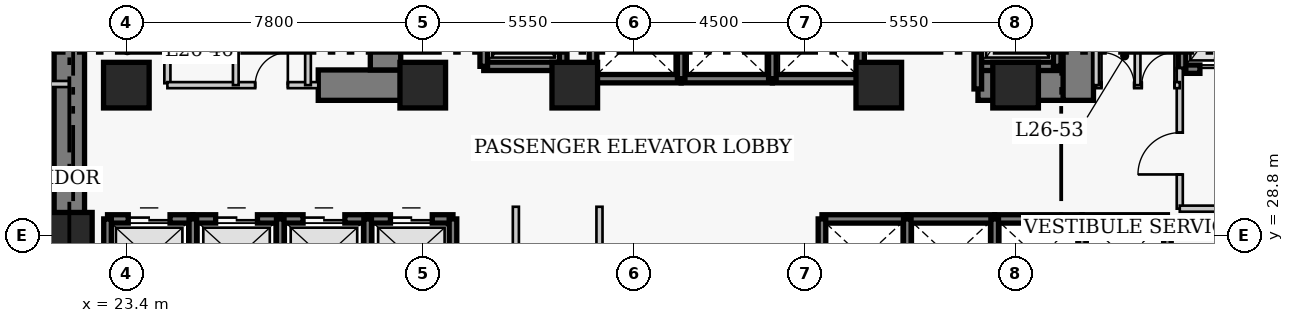
"""IFC4 building model, lengths in metres.
Left out: names, types, materials, properties, quantities, classifications, styles, units other than length and angle.
Written with IfcOpenShell. Run it as: python <this file> out.ifc"""

import sys

from ifc_helpers import new_model, si_unit, direction, frame, frame_2d, origin, origin_2d, place, context, subcontext, project, spatial, rectangle, extrude, element, fill, save


model = new_model("IFC4")
c1 = context("Model", 3, precision=1e-05, world=origin(), true_north=direction((0.0, 1.0)))
c2 = subcontext(c1, "Body", "Model", "MODEL_VIEW")
j1 = project(units=[si_unit("LENGTHUNIT", "METRE"), si_unit("PLANEANGLEUNIT", "RADIAN")], contexts=[c1])
p1 = place(None, origin())
s1 = spatial("IfcSite", under=j1, at=p1, CompositionType="ELEMENT")
p2 = place(p1, origin())
s2 = spatial("IfcBuilding", under=s1, at=p2, CompositionType="ELEMENT")
p3 = place(p2, frame((0.0, 0.0, 107.0)))
s3 = spatial("IfcBuildingStorey", under=s2, at=p3, CompositionType="ELEMENT", Elevation=107.0)
p4 = place(p3, frame((21.9, 27.05, 0.0), z_axis=(0.0, 0.0, 1.0), x_axis=(0.0, 1.0, 0.0)))
e1 = element("IfcWall", 1, at=p4, inside=s3, PredefinedType="SHEAR", context=c2, shape_type="SweptSolid", body=[
    extrude(rectangle(XDim=13.67, YDim=0.8, at=frame_2d((6.835, 0.0))), origin(), (0.0, 0.0, 1.0), 3.8),
])
p5 = place(p3, frame((28.45, 32.75, 0.0), z_axis=(0.0, 0.0, 1.0), x_axis=(1.0, 0.0, 0.0)))
e2 = element("IfcWall", 2, at=p5, inside=s3, PredefinedType="SHEAR", context=c2, shape_type="SweptSolid", body=[
    extrude(rectangle(XDim=2.4, YDim=0.8, at=frame_2d((1.2, 0.0))), origin(), (0.0, 0.0, 1.0), 3.8),
])
p6 = place(p3, frame((45.81, 32.75, 0.0), z_axis=(0.0, 0.0, 1.0), x_axis=(1.0, 0.0, 0.0)))
e3 = element("IfcWall", 3, at=p6, inside=s3, PredefinedType="SHEAR", context=c2, shape_type="SweptSolid", body=[
    extrude(rectangle(XDim=2.64, YDim=0.8, at=frame_2d((1.32, 0.0))), origin(), (0.0, 0.0, 1.0), 3.8),
])
p7 = place(p3, frame((30.22, 33.15, 0.0), z_axis=(0.0, 0.0, 1.0), x_axis=(0.0, 1.0, 0.0)))
e4 = element("IfcWall", 4, at=p7, inside=s3, PredefinedType="SHEAR", context=c2, shape_type="SweptSolid", body=[
    extrude(rectangle(XDim=7.17, YDim=0.8, at=frame_2d((3.585, 0.0))), origin(), (0.0, 0.0, 1.0), 3.8),
])
p8 = place(p3, frame((48.45, 32.35, 0.0), z_axis=(0.0, 0.0, 1.0), x_axis=(0.0, 1.0, 0.0)))
e5 = element("IfcWall", 5, at=p8, inside=s3, PredefinedType="SHEAR", context=c2, shape_type="SweptSolid", body=[
    extrude(rectangle(XDim=7.97, YDim=0.8, at=frame_2d((3.985, 0.0))), origin(), (0.0, 0.0, 1.0), 3.8),
])
p9 = place(p8, frame((5.85, 0.0, 0.0)))
e6 = element("IfcOpeningElement", 6, at=p9, cuts=e5, PredefinedType="OPENING", context=c2, shape_type="SweptSolid", body=[
    extrude(rectangle(XDim=1.1, YDim=2.15, at=frame_2d((0.55, 1.075))), frame((0.0, 0.41, 0.0), z_axis=(0.0, -1.0, 0.0), x_axis=(1.0, 0.0, 0.0)), (0.0, 0.0, 1.0), 0.82),
])
for number, where, z_axis, x_axis in (
    (7, (21.9, 28.8, 0.0), (0.0, 0.0, 1.0), (1.0, 0.0, 0.0)),
    (8, (23.4, 32.75, 0.0), (0.0, 0.0, 1.0), (1.0, 0.0, 0.0)),
    (9, (31.2, 32.75, 0.0), (0.0, 0.0, 1.0), (1.0, 0.0, 0.0)),
    (10, (35.2, 32.75, 0.0), (0.0, 0.0, 1.0), (1.0, 0.0, 0.0)),
    (11, (43.2, 32.75, 0.0), (0.0, 0.0, 1.0), (1.0, 0.0, 0.0)),
    (12, (46.8, 32.75, 0.0), (0.0, 0.0, 1.0), (1.0, 0.0, 0.0)),
):
    element("IfcColumn", number, at=place(p3, frame(where, z_axis=z_axis, x_axis=x_axis)), inside=s3, PredefinedType="COLUMN", context=c2, shape_type="SweptSolid", body=[
        extrude(rectangle(XDim=1.2, YDim=1.2, at=origin_2d()), origin(), (0.0, 0.0, 1.0), 3.8),
    ])
p10 = place(p3, frame((22.905, 29.23, 0.0), z_axis=(0.0, 0.0, 1.0), x_axis=(1.0, 0.0, 0.0)))
e13 = element("IfcWall", 13, at=p10, inside=s3, PredefinedType="SHEAR", context=c2, shape_type="SweptSolid", body=[
    extrude(rectangle(XDim=2.245, YDim=0.22, at=frame_2d((1.123, 0.0))), origin(), (0.0, 0.0, 1.0), 3.8),
])
p11 = place(p10, frame((0.545, 0.0, 0.0)))
e14 = element("IfcOpeningElement", 14, at=p11, cuts=e13, PredefinedType="OPENING", context=c2, shape_type="SweptSolid", body=[
    extrude(rectangle(XDim=1.1, YDim=2.15, at=frame_2d((0.55, 1.075))), frame((0.0, 0.12, 0.0), z_axis=(0.0, -1.0, 0.0), x_axis=(1.0, 0.0, 0.0)), (0.0, 0.0, 1.0), 0.24),
])
p12 = place(p3, frame((22.905, 27.17, 0.0), z_axis=(0.0, 0.0, 1.0), x_axis=(0.0, 1.0, 0.0)))
e15 = element("IfcWall", 15, at=p12, inside=s3, PredefinedType="SHEAR", context=c2, shape_type="SweptSolid", body=[
    extrude(rectangle(XDim=2.06, YDim=0.2, at=frame_2d((1.03, 0.0))), origin(), (0.0, 0.0, 1.0), 3.8),
])
p13 = place(p3, frame((25.15, 29.23, 0.0), z_axis=(0.0, 0.0, 1.0), x_axis=(1.0, 0.0, 0.0)))
e16 = element("IfcWall", 16, at=p13, inside=s3, PredefinedType="SHEAR", context=c2, shape_type="SweptSolid", body=[
    extrude(rectangle(XDim=2.3, YDim=0.22, at=frame_2d((1.15, 0.0))), origin(), (0.0, 0.0, 1.0), 3.8),
])
p14 = place(p13, frame((0.6, 0.0, 0.0)))
e17 = element("IfcOpeningElement", 17, at=p14, cuts=e16, PredefinedType="OPENING", context=c2, shape_type="SweptSolid", body=[
    extrude(rectangle(XDim=1.1, YDim=2.15, at=frame_2d((0.55, 1.075))), frame((0.0, 0.12, 0.0), z_axis=(0.0, -1.0, 0.0), x_axis=(1.0, 0.0, 0.0)), (0.0, 0.0, 1.0), 0.24),
])
p15 = place(p3, frame((25.15, 27.17, 0.0), z_axis=(0.0, 0.0, 1.0), x_axis=(0.0, 1.0, 0.0)))
e18 = element("IfcWall", 18, at=p15, inside=s3, PredefinedType="SHEAR", context=c2, shape_type="SweptSolid", body=[
    extrude(rectangle(XDim=2.06, YDim=0.2, at=frame_2d((1.03, 0.0))), origin(), (0.0, 0.0, 1.0), 3.8),
])
p16 = place(p3, frame((27.45, 29.23, 0.0), z_axis=(0.0, 0.0, 1.0), x_axis=(1.0, 0.0, 0.0)))
e19 = element("IfcWall", 19, at=p16, inside=s3, PredefinedType="SHEAR", context=c2, shape_type="SweptSolid", body=[
    extrude(rectangle(XDim=2.3, YDim=0.22, at=frame_2d((1.15, 0.0))), origin(), (0.0, 0.0, 1.0), 3.8),
])
p17 = place(p16, frame((0.6, 0.0, 0.0)))
e20 = element("IfcOpeningElement", 20, at=p17, cuts=e19, PredefinedType="OPENING", context=c2, shape_type="SweptSolid", body=[
    extrude(rectangle(XDim=1.1, YDim=2.15, at=frame_2d((0.55, 1.075))), frame((0.0, 0.12, 0.0), z_axis=(0.0, -1.0, 0.0), x_axis=(1.0, 0.0, 0.0)), (0.0, 0.0, 1.0), 0.24),
])
p18 = place(p3, frame((27.45, 27.17, 0.0), z_axis=(0.0, 0.0, 1.0), x_axis=(0.0, 1.0, 0.0)))
e21 = element("IfcWall", 21, at=p18, inside=s3, PredefinedType="SHEAR", context=c2, shape_type="SweptSolid", body=[
    extrude(rectangle(XDim=2.06, YDim=0.2, at=frame_2d((1.03, 0.0))), origin(), (0.0, 0.0, 1.0), 3.8),
])
p19 = place(p3, frame((29.75, 29.23, 0.0), z_axis=(0.0, 0.0, 1.0), x_axis=(1.0, 0.0, 0.0)))
e22 = element("IfcWall", 22, at=p19, inside=s3, PredefinedType="SHEAR", context=c2, shape_type="SweptSolid", body=[
    extrude(rectangle(XDim=2.245, YDim=0.22, at=frame_2d((1.123, 0.0))), origin(), (0.0, 0.0, 1.0), 3.8),
])
p20 = place(p19, frame((0.6, 0.0, 0.0)))
e23 = element("IfcOpeningElement", 23, at=p20, cuts=e22, PredefinedType="OPENING", context=c2, shape_type="SweptSolid", body=[
    extrude(rectangle(XDim=1.1, YDim=2.15, at=frame_2d((0.55, 1.075))), frame((0.0, 0.12, 0.0), z_axis=(0.0, -1.0, 0.0), x_axis=(1.0, 0.0, 0.0)), (0.0, 0.0, 1.0), 0.24),
])
for number, where, z_axis, x_axis in (
    (24, (29.75, 27.17, 0.0), (0.0, 0.0, 1.0), (0.0, 1.0, 0.0)),
    (25, (31.995, 27.17, 0.0), (0.0, 0.0, 1.0), (0.0, 1.0, 0.0)),
):
    element("IfcWall", number, at=place(p3, frame(where, z_axis=z_axis, x_axis=x_axis)), inside=s3, PredefinedType="SHEAR", context=c2, shape_type="SweptSolid", body=[
        extrude(rectangle(XDim=2.06, YDim=0.2, at=frame_2d((1.03, 0.0))), origin(), (0.0, 0.0, 1.0), 3.8),
    ])
p21 = place(p3, frame((41.705, 29.23, 0.0), z_axis=(0.0, 0.0, 1.0), x_axis=(1.0, 0.0, 0.0)))
e26 = element("IfcWall", 26, at=p21, inside=s3, PredefinedType="SHEAR", context=c2, shape_type="SweptSolid", body=[
    extrude(rectangle(XDim=2.245, YDim=0.22, at=frame_2d((1.123, 0.0))), origin(), (0.0, 0.0, 1.0), 3.8),
])
p22 = place(p3, frame((41.705, 27.17, 0.0), z_axis=(0.0, 0.0, 1.0), x_axis=(0.0, 1.0, 0.0)))
e27 = element("IfcWall", 27, at=p22, inside=s3, PredefinedType="SHEAR", context=c2, shape_type="SweptSolid", body=[
    extrude(rectangle(XDim=2.06, YDim=0.2, at=frame_2d((1.03, 0.0))), origin(), (0.0, 0.0, 1.0), 3.8),
])
p23 = place(p3, frame((43.95, 29.23, 0.0), z_axis=(0.0, 0.0, 1.0), x_axis=(1.0, 0.0, 0.0)))
e28 = element("IfcWall", 28, at=p23, inside=s3, PredefinedType="SHEAR", context=c2, shape_type="SweptSolid", body=[
    extrude(rectangle(XDim=2.3, YDim=0.22, at=frame_2d((1.15, 0.0))), origin(), (0.0, 0.0, 1.0), 3.8),
])
p24 = place(p3, frame((43.95, 27.17, 0.0), z_axis=(0.0, 0.0, 1.0), x_axis=(0.0, 1.0, 0.0)))
e29 = element("IfcWall", 29, at=p24, inside=s3, PredefinedType="SHEAR", context=c2, shape_type="SweptSolid", body=[
    extrude(rectangle(XDim=2.06, YDim=0.2, at=frame_2d((1.03, 0.0))), origin(), (0.0, 0.0, 1.0), 3.8),
])
p25 = place(p3, frame((46.25, 29.23, 0.0), z_axis=(0.0, 0.0, 1.0), x_axis=(1.0, 0.0, 0.0)))
e30 = element("IfcWall", 30, at=p25, inside=s3, PredefinedType="SHEAR", context=c2, shape_type="SweptSolid", body=[
    extrude(rectangle(XDim=2.3, YDim=0.22, at=frame_2d((1.15, 0.0))), origin(), (0.0, 0.0, 1.0), 3.8),
])
p26 = place(p3, frame((46.25, 27.17, 0.0), z_axis=(0.0, 0.0, 1.0), x_axis=(0.0, 1.0, 0.0)))
e31 = element("IfcWall", 31, at=p26, inside=s3, PredefinedType="SHEAR", context=c2, shape_type="SweptSolid", body=[
    extrude(rectangle(XDim=2.06, YDim=0.2, at=frame_2d((1.03, 0.0))), origin(), (0.0, 0.0, 1.0), 3.8),
])
p27 = place(p3, frame((48.55, 29.23, 0.0), z_axis=(0.0, 0.0, 1.0), x_axis=(1.0, 0.0, 0.0)))
e32 = element("IfcWall", 32, at=p27, inside=s3, PredefinedType="SHEAR", context=c2, shape_type="SweptSolid", body=[
    extrude(rectangle(XDim=2.245, YDim=0.22, at=frame_2d((1.123, 0.0))), origin(), (0.0, 0.0, 1.0), 3.8),
])
for number, where, z_axis, x_axis in (
    (33, (48.55, 27.17, 0.0), (0.0, 0.0, 1.0), (0.0, 1.0, 0.0)),
    (34, (50.795, 27.17, 0.0), (0.0, 0.0, 1.0), (0.0, 1.0, 0.0)),
):
    element("IfcWall", number, at=place(p3, frame(where, z_axis=z_axis, x_axis=x_axis)), inside=s3, PredefinedType="SHEAR", context=c2, shape_type="SweptSolid", body=[
        extrude(rectangle(XDim=2.06, YDim=0.2, at=frame_2d((1.03, 0.0))), origin(), (0.0, 0.0, 1.0), 3.8),
    ])
p28 = place(p3, frame((35.68, 32.92, 0.0), z_axis=(0.0, 0.0, 1.0), x_axis=(1.0, 0.0, 0.0)))
e35 = element("IfcWall", 35, at=p28, inside=s3, PredefinedType="SHEAR", context=c2, shape_type="SweptSolid", body=[
    extrude(rectangle(XDim=2.32, YDim=0.22, at=frame_2d((1.16, 0.0))), origin(), (0.0, 0.0, 1.0), 3.8),
])
p29 = place(p3, frame((35.68, 32.92, 0.0), z_axis=(0.0, 0.0, 1.0), x_axis=(0.0, 1.0, 0.0)))
e36 = element("IfcWall", 36, at=p29, inside=s3, PredefinedType="SHEAR", context=c2, shape_type="SweptSolid", body=[
    extrude(rectangle(XDim=2.16, YDim=0.2, at=frame_2d((1.08, 0.0))), origin(), (0.0, 0.0, 1.0), 3.8),
])
p30 = place(p3, frame((38.0, 32.92, 0.0), z_axis=(0.0, 0.0, 1.0), x_axis=(1.0, 0.0, 0.0)))
e37 = element("IfcWall", 37, at=p30, inside=s3, PredefinedType="SHEAR", context=c2, shape_type="SweptSolid", body=[
    extrude(rectangle(XDim=2.4, YDim=0.22, at=frame_2d((1.2, 0.0))), origin(), (0.0, 0.0, 1.0), 3.8),
])
p31 = place(p3, frame((38.0, 32.92, 0.0), z_axis=(0.0, 0.0, 1.0), x_axis=(0.0, 1.0, 0.0)))
e38 = element("IfcWall", 38, at=p31, inside=s3, PredefinedType="SHEAR", context=c2, shape_type="SweptSolid", body=[
    extrude(rectangle(XDim=2.16, YDim=0.2, at=frame_2d((1.08, 0.0))), origin(), (0.0, 0.0, 1.0), 3.8),
])
p32 = place(p3, frame((40.4, 32.92, 0.0), z_axis=(0.0, 0.0, 1.0), x_axis=(1.0, 0.0, 0.0)))
e39 = element("IfcWall", 39, at=p32, inside=s3, PredefinedType="SHEAR", context=c2, shape_type="SweptSolid", body=[
    extrude(rectangle(XDim=2.32, YDim=0.22, at=frame_2d((1.16, 0.0))), origin(), (0.0, 0.0, 1.0), 3.8),
])
for number, where, z_axis, x_axis in (
    (40, (40.4, 32.92, 0.0), (0.0, 0.0, 1.0), (0.0, 1.0, 0.0)),
    (41, (42.72, 32.92, 0.0), (0.0, 0.0, 1.0), (0.0, 1.0, 0.0)),
):
    element("IfcWall", number, at=place(p3, frame(where, z_axis=z_axis, x_axis=x_axis)), inside=s3, PredefinedType="SHEAR", context=c2, shape_type="SweptSolid", body=[
        extrude(rectangle(XDim=2.16, YDim=0.2, at=frame_2d((1.08, 0.0))), origin(), (0.0, 0.0, 1.0), 3.8),
    ])
p33 = place(p3, frame((51.18, 33.17, 0.0), z_axis=(0.0, 0.0, 1.0), x_axis=(1.0, 0.0, 0.0)))
e42 = element("IfcWall", 42, at=p33, inside=s3, PredefinedType="SHEAR", context=c2, shape_type="SweptSolid", body=[
    extrude(rectangle(XDim=2.42, YDim=0.22, at=frame_2d((1.21, 0.0))), origin(), (0.0, 0.0, 1.0), 3.8),
])
p34 = place(p33, frame((0.47, 0.0, 0.0)))
e43 = element("IfcOpeningElement", 43, at=p34, cuts=e42, PredefinedType="OPENING", context=c2, shape_type="SweptSolid", body=[
    extrude(rectangle(XDim=1.3, YDim=2.15, at=frame_2d((0.65, 1.075))), frame((0.0, 0.12, 0.0), z_axis=(0.0, -1.0, 0.0), x_axis=(1.0, 0.0, 0.0)), (0.0, 0.0, 1.0), 0.24),
])
p35 = place(p3, frame((51.18, 33.17, 0.0), z_axis=(0.0, 0.0, 1.0), x_axis=(0.0, 1.0, 0.0)))
e44 = element("IfcWall", 44, at=p35, inside=s3, PredefinedType="SHEAR", context=c2, shape_type="SweptSolid", body=[
    extrude(rectangle(XDim=2.86, YDim=0.2, at=frame_2d((1.43, 0.0))), origin(), (0.0, 0.0, 1.0), 3.8),
])
p36 = place(p3, frame((32.805, 33.245, 0.0), z_axis=(0.0, 0.0, 1.0), x_axis=(1.0, 0.0, 0.0)))
e45 = element("IfcWall", 45, at=p36, inside=s3, PredefinedType="SHEAR", context=c2, shape_type="SweptSolid", body=[
    extrude(rectangle(XDim=2.09, YDim=0.22, at=frame_2d((1.045, 0.0))), origin(), (0.0, 0.0, 1.0), 3.8),
])
for number, where, z_axis, x_axis in (
    (46, (32.805, 33.245, 0.0), (0.0, 0.0, 1.0), (0.0, 1.0, 0.0)),
    (47, (34.895, 33.245, 0.0), (0.0, 0.0, 1.0), (0.0, 1.0, 0.0)),
):
    element("IfcWall", number, at=place(p3, frame(where, z_axis=z_axis, x_axis=x_axis)), inside=s3, PredefinedType="SHEAR", context=c2, shape_type="SweptSolid", body=[
        extrude(rectangle(XDim=2.91, YDim=0.2, at=frame_2d((1.455, 0.0))), origin(), (0.0, 0.0, 1.0), 3.8),
    ])
p37 = place(p3, frame((45.805, 33.245, 0.0), z_axis=(0.0, 0.0, 1.0), x_axis=(1.0, 0.0, 0.0)))
e48 = element("IfcWall", 48, at=p37, inside=s3, PredefinedType="SHEAR", context=c2, shape_type="SweptSolid", body=[
    extrude(rectangle(XDim=2.09, YDim=0.22, at=frame_2d((1.045, 0.0))), origin(), (0.0, 0.0, 1.0), 3.8),
])
p38 = place(p3, frame((45.805, 32.65, 0.0), z_axis=(0.0, 0.0, 1.0), x_axis=(0.0, 1.0, 0.0)))
e49 = element("IfcWall", 49, at=p38, inside=s3, PredefinedType="SHEAR", context=c2, shape_type="SweptSolid", body=[
    extrude(rectangle(XDim=3.505, YDim=0.2, at=frame_2d((1.752, 0.0))), origin(), (0.0, 0.0, 1.0), 3.8),
])
p39 = place(p3, frame((47.895, 33.245, 0.0), z_axis=(0.0, 0.0, 1.0), x_axis=(0.0, 1.0, 0.0)))
e50 = element("IfcWall", 50, at=p39, inside=s3, PredefinedType="SHEAR", context=c2, shape_type="SweptSolid", body=[
    extrude(rectangle(XDim=2.91, YDim=0.2, at=frame_2d((1.455, 0.0))), origin(), (0.0, 0.0, 1.0), 3.8),
])
p40 = place(p3, frame((24.48, 32.8, 0.0), z_axis=(0.0, 0.0, 1.0), x_axis=(0.0, 1.0, 0.0)))
e51 = element("IfcWall", 51, at=p40, inside=s3, PredefinedType="PARTITIONING", context=c2, shape_type="SweptSolid", body=[
    extrude(rectangle(XDim=3.57, YDim=0.16, at=frame_2d((1.785, 0.0))), origin(), (0.0, 0.0, 1.0), 3.54),
])
p41 = place(p40, frame((1.604, 0.0, 0.0)))
e52 = element("IfcOpeningElement", 52, at=p41, cuts=e51, PredefinedType="OPENING", context=c2, shape_type="SweptSolid", body=[
    extrude(rectangle(XDim=0.9, YDim=2.1, at=frame_2d((0.45, 1.05))), frame((0.0, 0.09, 0.0), z_axis=(0.0, -1.0, 0.0), x_axis=(1.0, 0.0, 0.0)), (0.0, 0.0, 1.0), 0.18),
])
p42 = place(p3, frame((51.12, 29.5, 0.0), z_axis=(0.0, 0.0, 1.0), x_axis=(0.0, 1.0, 0.0)))
e53 = element("IfcWall", 53, at=p42, inside=s3, PredefinedType="PARTITIONING", context=c2, shape_type="SweptSolid", body=[
    extrude(rectangle(XDim=3.7, YDim=0.16, at=frame_2d((1.85, 0.0))), origin(), (0.0, 0.0, 1.0), 3.54),
])
p43 = place(p42, frame((0.9, 0.0, 0.0)))
e54 = element("IfcOpeningElement", 54, at=p43, cuts=e53, PredefinedType="OPENING", context=c2, shape_type="SweptSolid", body=[
    extrude(rectangle(XDim=1.1, YDim=2.15, at=frame_2d((0.55, 1.075))), frame((0.0, 0.09, 0.0), z_axis=(0.0, -1.0, 0.0), x_axis=(1.0, 0.0, 0.0)), (0.0, 0.0, 1.0), 0.18),
])
p44 = place(p3, frame((51.12, 29.5, 0.0), z_axis=(0.0, 0.0, 1.0), x_axis=(1.0, 0.0, 0.0)))
e55 = element("IfcWall", 55, at=p44, inside=s3, PredefinedType="PARTITIONING", context=c2, shape_type="SweptSolid", body=[
    extrude(rectangle(XDim=5.63, YDim=0.16, at=frame_2d((2.815, 0.0))), origin(), (0.0, 0.0, 1.0), 3.54),
])
p45 = place(p3, frame((24.48, 32.75, 0.0), z_axis=(0.0, 0.0, 1.0), x_axis=(1.0, 0.0, 0.0)))
e56 = element("IfcWall", 56, at=p45, inside=s3, PredefinedType="PARTITIONING", context=c2, shape_type="SweptSolid", body=[
    extrude(rectangle(XDim=3.97, YDim=0.16, at=frame_2d((1.985, 0.0))), origin(), (0.0, 0.0, 1.0), 3.54),
])
p46 = place(p45, frame((2.31, 0.0, 0.0)))
e57 = element("IfcOpeningElement", 57, at=p46, cuts=e56, PredefinedType="OPENING", context=c2, shape_type="SweptSolid", body=[
    extrude(rectangle(XDim=0.86, YDim=2.05, at=frame_2d((0.43, 1.025))), frame((0.0, 0.09, 0.0), z_axis=(0.0, -1.0, 0.0), x_axis=(1.0, 0.0, 0.0)), (0.0, 0.0, 1.0), 0.18),
])
p47 = place(p3, frame((48.92, 32.75, 0.0), z_axis=(0.0, 0.0, 1.0), x_axis=(1.0, 0.0, 0.0)))
e58 = element("IfcWall", 58, at=p47, inside=s3, PredefinedType="PARTITIONING", context=c2, shape_type="SweptSolid", body=[
    extrude(rectangle(XDim=2.2, YDim=0.16, at=frame_2d((1.1, 0.0))), origin(), (0.0, 0.0, 1.0), 3.54),
])
p48 = place(p47, frame((0.14, 0.0, 0.0)))
e59 = element("IfcOpeningElement", 59, at=p48, cuts=e58, PredefinedType="OPENING", context=c2, shape_type="SweptSolid", body=[
    extrude(rectangle(XDim=0.86, YDim=2.05, at=frame_2d((0.43, 1.025))), frame((0.0, 0.09, 0.0), z_axis=(0.0, -1.0, 0.0), x_axis=(1.0, 0.0, 0.0)), (0.0, 0.0, 1.0), 0.18),
])
p49 = place(p47, frame((1.2, 0.0, 0.0)))
e60 = element("IfcOpeningElement", 60, at=p49, cuts=e58, PredefinedType="OPENING", context=c2, shape_type="SweptSolid", body=[
    extrude(rectangle(XDim=0.86, YDim=2.05, at=frame_2d((0.43, 1.025))), frame((0.0, 0.09, 0.0), z_axis=(0.0, -1.0, 0.0), x_axis=(1.0, 0.0, 0.0)), (0.0, 0.0, 1.0), 0.18),
])
for number, where, z_axis, x_axis in (
    (61, (48.92, 32.75, 0.0), (0.0, 0.0, 1.0), (0.0, 1.0, 0.0)),
    (62, (26.28, 32.75, 0.0), (0.0, 0.0, 1.0), (0.0, 1.0, 0.0)),
    (63, (28.18, 32.75, 0.0), (0.0, 0.0, 1.0), (0.0, 1.0, 0.0)),
    (64, (50.01, 32.75, 0.0), (0.0, 0.0, 1.0), (0.0, 1.0, 0.0)),
):
    element("IfcWall", number, at=place(p3, frame(where, z_axis=z_axis, x_axis=x_axis)), inside=s3, PredefinedType="PARTITIONING", context=c2, shape_type="SweptSolid", body=[
        extrude(rectangle(XDim=3.62, YDim=0.15, at=frame_2d((1.81, 0.0))), origin(), (0.0, 0.0, 1.0), 3.54),
    ])
for number, where, z_axis, x_axis in (
    (65, (33.65, 24.66, 0.0), (0.0, 0.0, 1.0), (0.0, 1.0, 0.0)),
    (66, (35.85, 24.66, 0.0), (0.0, 0.0, 1.0), (0.0, 1.0, 0.0)),
):
    element("IfcWall", number, at=place(p3, frame(where, z_axis=z_axis, x_axis=x_axis)), inside=s3, PredefinedType="PARTITIONING", context=c2, shape_type="SweptSolid", body=[
        extrude(rectangle(XDim=4.89, YDim=0.16, at=frame_2d((2.445, 0.0))), origin(), (0.0, 0.0, 1.0), 3.54),
    ])
p50 = place(p3, frame((19.41, 32.78, 0.0), z_axis=(0.0, 0.0, 1.0), x_axis=(1.0, 0.0, 0.0)))
e67 = element("IfcWall", 67, at=p50, inside=s3, PredefinedType="PARTITIONING", context=c2, shape_type="SweptSolid", body=[
    extrude(rectangle(XDim=2.49, YDim=0.16, at=frame_2d((1.245, 0.0))), origin(), (0.0, 0.0, 1.0), 3.54),
])
p51 = place(p11, origin())
e68 = element("IfcDoor", 68, at=p51, inside=s3, OperationType="DOUBLE_DOOR_SLIDING", PredefinedType="DOOR", context=c2, shape_type="SweptSolid", body=[
    extrude(rectangle(XDim=1.1, YDim=2.15, at=frame_2d((0.55, 1.075))), frame((0.0, 0.025, 0.0), z_axis=(0.0, -1.0, 0.0), x_axis=(1.0, 0.0, 0.0)), (0.0, 0.0, 1.0), 0.05),
])
fill(e14, e68)
p52 = place(p14, origin())
e69 = element("IfcDoor", 69, at=p52, inside=s3, OperationType="DOUBLE_DOOR_SLIDING", PredefinedType="DOOR", context=c2, shape_type="SweptSolid", body=[
    extrude(rectangle(XDim=1.1, YDim=2.15, at=frame_2d((0.55, 1.075))), frame((0.0, 0.025, 0.0), z_axis=(0.0, -1.0, 0.0), x_axis=(1.0, 0.0, 0.0)), (0.0, 0.0, 1.0), 0.05),
])
fill(e17, e69)
p53 = place(p17, origin())
e70 = element("IfcDoor", 70, at=p53, inside=s3, OperationType="DOUBLE_DOOR_SLIDING", PredefinedType="DOOR", context=c2, shape_type="SweptSolid", body=[
    extrude(rectangle(XDim=1.1, YDim=2.15, at=frame_2d((0.55, 1.075))), frame((0.0, 0.025, 0.0), z_axis=(0.0, -1.0, 0.0), x_axis=(1.0, 0.0, 0.0)), (0.0, 0.0, 1.0), 0.05),
])
fill(e20, e70)
p54 = place(p20, origin())
e71 = element("IfcDoor", 71, at=p54, inside=s3, OperationType="DOUBLE_DOOR_SLIDING", PredefinedType="DOOR", context=c2, shape_type="SweptSolid", body=[
    extrude(rectangle(XDim=1.1, YDim=2.15, at=frame_2d((0.55, 1.075))), frame((0.0, 0.025, 0.0), z_axis=(0.0, -1.0, 0.0), x_axis=(1.0, 0.0, 0.0)), (0.0, 0.0, 1.0), 0.05),
])
fill(e23, e71)
p55 = place(p34, origin())
e72 = element("IfcDoor", 72, at=p55, inside=s3, OperationType="DOUBLE_DOOR_SLIDING", PredefinedType="DOOR", context=c2, shape_type="SweptSolid", body=[
    extrude(rectangle(XDim=1.3, YDim=2.15, at=frame_2d((0.65, 1.075))), frame((0.0, 0.025, 0.0), z_axis=(0.0, -1.0, 0.0), x_axis=(1.0, 0.0, 0.0)), (0.0, 0.0, 1.0), 0.05),
])
fill(e43, e72)
p56 = place(p43, origin())
e73 = element("IfcDoor", 73, at=p56, inside=s3, OperationType="SINGLE_SWING_LEFT", PredefinedType="DOOR", context=c2, shape_type="SweptSolid", body=[
    extrude(rectangle(XDim=1.1, YDim=2.15, at=frame_2d((0.55, 1.075))), frame((0.0, 0.025, 0.0), z_axis=(0.0, -1.0, 0.0), x_axis=(1.0, 0.0, 0.0)), (0.0, 0.0, 1.0), 0.05),
])
fill(e54, e73)
p57 = place(p46, origin())
e74 = element("IfcDoor", 74, at=p57, inside=s3, OperationType="SINGLE_SWING_RIGHT", PredefinedType="DOOR", context=c2, shape_type="SweptSolid", body=[
    extrude(rectangle(XDim=0.86, YDim=2.05, at=frame_2d((0.43, 1.025))), frame((0.0, 0.025, 0.0), z_axis=(0.0, -1.0, 0.0), x_axis=(1.0, 0.0, 0.0)), (0.0, 0.0, 1.0), 0.05),
])
fill(e57, e74)
p58 = place(p48, origin())
e75 = element("IfcDoor", 75, at=p58, inside=s3, OperationType="SINGLE_SWING_LEFT", PredefinedType="DOOR", context=c2, shape_type="SweptSolid", body=[
    extrude(rectangle(XDim=0.86, YDim=2.05, at=frame_2d((0.43, 1.025))), frame((0.0, 0.025, 0.0), z_axis=(0.0, -1.0, 0.0), x_axis=(1.0, 0.0, 0.0)), (0.0, 0.0, 1.0), 0.05),
])
fill(e59, e75)
p59 = place(p49, origin())
e76 = element("IfcDoor", 76, at=p59, inside=s3, OperationType="SINGLE_SWING_RIGHT", PredefinedType="DOOR", context=c2, shape_type="SweptSolid", body=[
    extrude(rectangle(XDim=0.86, YDim=2.05, at=frame_2d((0.43, 1.025))), frame((0.0, 0.025, 0.0), z_axis=(0.0, -1.0, 0.0), x_axis=(1.0, 0.0, 0.0)), (0.0, 0.0, 1.0), 0.05),
])
fill(e60, e76)
save(model, sys.argv[1])
